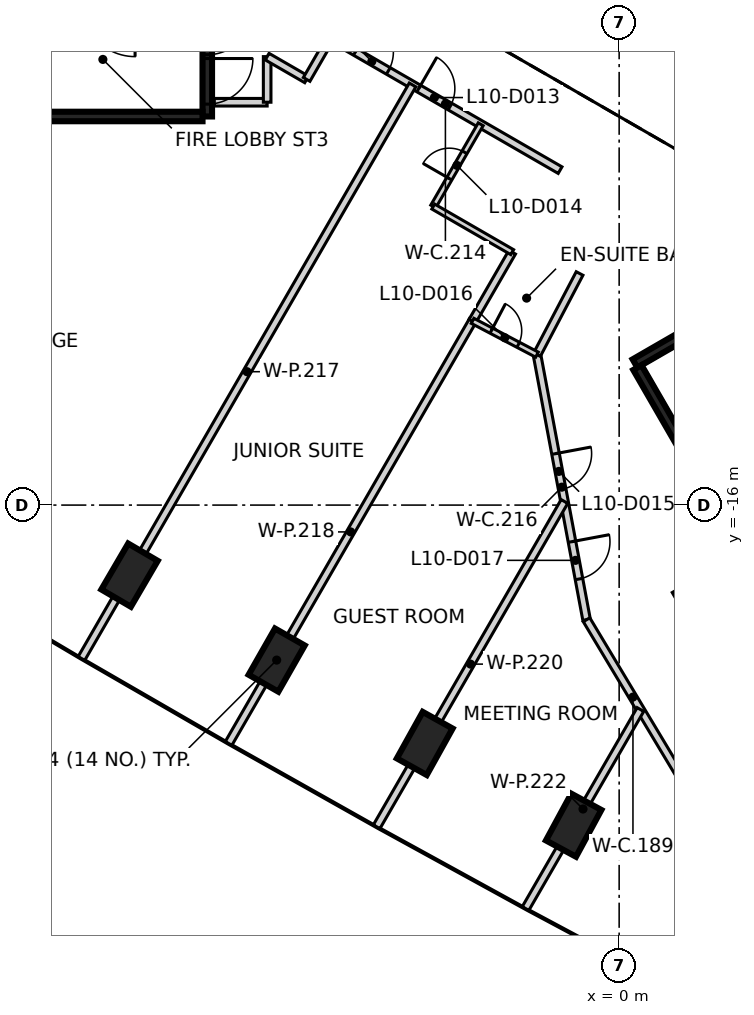
"""IFC4 building model, lengths in metres.
Left out: names, types, materials, properties, quantities, classifications, styles, units other than length and angle.
Written with IfcOpenShell. Run it as: python <this file> out.ifc"""

import sys

from ifc_helpers import new_model, si_unit, direction, frame, frame_2d, origin, origin_2d, place, context, subcontext, project, spatial, rectangle, extrude, element, fill, save


model = new_model("IFC4")
c1 = context("Model", 3, precision=1e-05, world=origin(), true_north=direction((0.0, 1.0)))
c2 = subcontext(c1, "Body", "Model", "MODEL_VIEW")
j1 = project(units=[si_unit("LENGTHUNIT", "METRE"), si_unit("PLANEANGLEUNIT", "RADIAN")], contexts=[c1])
p1 = place(None, origin())
s1 = spatial("IfcSite", under=j1, at=p1, CompositionType="ELEMENT")
p2 = place(p1, origin())
s2 = spatial("IfcBuilding", under=s1, at=p2, CompositionType="ELEMENT")
p3 = place(p2, frame((0.0, 0.0, 49.4)))
s3 = spatial("IfcBuildingStorey", under=s2, at=p3, CompositionType="ELEMENT", Elevation=49.4)
for number, where, z_axis, x_axis in (
    (1, (-12.883, -17.844, -0.475), (0.0, 0.0, 1.0), (0.505, 0.863, 0.0)),
    (2, (-9.011, -20.079, -0.475), (0.0, 0.0, 1.0), (0.495, 0.869, 0.0)),
    (3, (-5.116, -22.272, -0.475), (0.0, 0.0, 1.0), (0.486, 0.874, 0.0)),
    (4, (-1.197, -24.423, -0.475), (0.0, 0.0, 1.0), (0.476, 0.879, 0.0)),
):
    element("IfcColumn", number, at=place(p3, frame(where, z_axis=z_axis, x_axis=x_axis)), inside=s3, PredefinedType="COLUMN", context=c2, shape_type="SweptSolid", body=[
        extrude(rectangle(XDim=1.4, YDim=0.9, at=origin_2d()), origin(), (0.0, 0.0, 1.0), 3.6),
    ])
p4 = place(p3, frame((-10.837, 5.775, 0.0), z_axis=(0.0, 0.0, 1.0), x_axis=(0.0, -1.0, 0.0)))
e5 = element("IfcWall", 5, at=p4, inside=s3, PredefinedType="SHEAR", context=c2, shape_type="SweptSolid", body=[
    extrude(rectangle(XDim=11.55, YDim=0.25, at=frame_2d((5.775, 0.0))), origin(), (0.0, 0.0, 1.0), 3.125),
])
p5 = place(p4, frame((10.025, 0.0, 0.0)))
e6 = element("IfcOpeningElement", 6, at=p5, cuts=e5, PredefinedType="OPENING", context=c2, shape_type="SweptSolid", body=[
    extrude(rectangle(XDim=1.2, YDim=2.1, at=frame_2d((0.6, 1.05))), frame((0.0, 0.135, 0.0), z_axis=(0.0, -1.0, 0.0), x_axis=(1.0, 0.0, 0.0)), (0.0, 0.0, 1.0), 0.27),
])
p6 = place(p4, frame((8.725, 0.0, 0.0)))
e7 = element("IfcOpeningElement", 7, at=p6, cuts=e5, PredefinedType="OPENING", context=c2, shape_type="SweptSolid", body=[
    extrude(rectangle(XDim=1.2, YDim=2.1, at=frame_2d((0.6, 1.05))), frame((0.0, 0.135, 0.0), z_axis=(0.0, -1.0, 0.0), x_axis=(1.0, 0.0, 0.0)), (0.0, 0.0, 1.0), 0.27),
])
p7 = place(p3, frame((-10.963, -5.775, 0.0), z_axis=(0.0, 0.0, 1.0), x_axis=(-1.0, 0.0, 0.0)))
e8 = element("IfcWall", 8, at=p7, inside=s3, PredefinedType="SHEAR", context=c2, shape_type="SweptSolid", body=[
    extrude(rectangle(XDim=5.225, YDim=0.25, at=frame_2d((2.612, 0.0))), origin(), (0.0, 0.0, 1.0), 3.125),
])
p8 = place(p3, frame((0.417, -12.273, 0.0), z_axis=(0.0, 0.0, 1.0), x_axis=(0.866021906294, 0.500006057782, 0.0)))
e9 = element("IfcWall", 9, at=p8, inside=s3, PredefinedType="SHEAR", context=c2, shape_type="SweptSolid", body=[
    extrude(rectangle(XDim=11.55, YDim=0.25, at=frame_2d((5.775, 0.0))), origin(), (0.0, 0.0, 1.0), 3.125),
])
p9 = place(p8, frame((10.025, 0.0, 0.0)))
e10 = element("IfcOpeningElement", 10, at=p9, cuts=e9, PredefinedType="OPENING", context=c2, shape_type="SweptSolid", body=[
    extrude(rectangle(XDim=1.2, YDim=2.1, at=frame_2d((0.6, 1.05))), frame((0.0, 0.135, 0.0), z_axis=(0.0, -1.0, 0.0), x_axis=(1.0, 0.0, 0.0)), (0.0, 0.0, 1.0), 0.27),
])
p10 = place(p8, frame((8.725, 0.0, 0.0)))
e11 = element("IfcOpeningElement", 11, at=p10, cuts=e9, PredefinedType="OPENING", context=c2, shape_type="SweptSolid", body=[
    extrude(rectangle(XDim=1.2, YDim=2.1, at=frame_2d((0.6, 1.05))), frame((0.0, 0.135, 0.0), z_axis=(0.0, -1.0, 0.0), x_axis=(1.0, 0.0, 0.0)), (0.0, 0.0, 1.0), 0.27),
])
p11 = place(p3, frame((3.235, -17.153, 0.0), z_axis=(0.0, 0.0, 1.0), x_axis=(-0.500008851346, 0.866020293397, 0.0)))
e12 = element("IfcWall", 12, at=p11, inside=s3, PredefinedType="SHEAR", context=c2, shape_type="SweptSolid", body=[
    extrude(rectangle(XDim=5.51, YDim=0.25, at=frame_2d((2.755, 0.0))), origin(), (0.0, 0.0, 1.0), 3.125),
])
p12 = place(p3, frame((-10.652, -5.4, 0.0), z_axis=(0.0, 0.0, 1.0), x_axis=(1.0, 0.0, 0.0)))
e13 = element("IfcWall", 13, at=p12, inside=s3, PredefinedType="PARTITIONING", context=c2, shape_type="SweptSolid", body=[
    extrude(rectangle(XDim=1.39, YDim=0.2, at=frame_2d((0.695, 0.0))), origin(), (0.0, 0.0, 1.0), 3.125),
])
for number, where, z_axis, x_axis in (
    (14, (-9.262, -5.4, 0.0), (0.0, 0.0, 1.0), (0.0, 1.0, 0.0)),
    (15, (-9.262, -4.2, 0.0), (0.0, 0.0, 1.0), (0.866, -0.5, 0.0)),
):
    element("IfcWall", number, at=place(p3, frame(where, z_axis=z_axis, x_axis=x_axis)), inside=s3, PredefinedType="PARTITIONING", context=c2, shape_type="SweptSolid", body=[
        extrude(rectangle(XDim=1.2, YDim=0.2, at=frame_2d((0.6, 0.0))), origin(), (0.0, 0.0, 1.0), 3.125),
    ])
p13 = place(p3, frame((-8.223, -4.8, 0.0), z_axis=(0.0, 0.0, 1.0), x_axis=(0.499866914522, 0.866102227088, 0.0)))
e16 = element("IfcWall", 16, at=p13, inside=s3, PredefinedType="PARTITIONING", context=c2, shape_type="SweptSolid", body=[
    extrude(rectangle(XDim=1.268, YDim=0.2, at=frame_2d((0.634, 0.0))), origin(), (0.0, 0.0, 1.0), 3.125),
])
p14 = place(p3, frame((-7.589, -3.702, 0.0), z_axis=(0.0, 0.0, 1.0), x_axis=(0.865994210678, -0.500054024153, 0.0)))
e17 = element("IfcWall", 17, at=p14, inside=s3, PredefinedType="PARTITIONING", context=c2, shape_type="SweptSolid", body=[
    extrude(rectangle(XDim=6.969, YDim=0.2, at=frame_2d((3.484, 0.0))), origin(), (0.0, 0.0, 1.0), 3.125),
])
p15 = place(p14, frame((0.749, 0.0, 0.0)))
e18 = element("IfcOpeningElement", 18, at=p15, cuts=e17, PredefinedType="OPENING", context=c2, shape_type="SweptSolid", body=[
    extrude(rectangle(XDim=1.0, YDim=2.1, at=frame_2d((0.5, 1.05))), frame((0.0, 0.11, 0.0), z_axis=(0.0, -1.0, 0.0), x_axis=(1.0, 0.0, 0.0)), (0.0, 0.0, 1.0), 0.22),
])
p16 = place(p14, frame((2.674, 0.0, 0.0)))
e19 = element("IfcOpeningElement", 19, at=p16, cuts=e17, PredefinedType="OPENING", context=c2, shape_type="SweptSolid", body=[
    extrude(rectangle(XDim=0.95, YDim=2.1, at=frame_2d((0.475, 1.05))), frame((0.0, 0.11, 0.0), z_axis=(0.0, -1.0, 0.0), x_axis=(1.0, 0.0, 0.0)), (0.0, 0.0, 1.0), 0.22),
])
p17 = place(p3, frame((-2.162, -12.042, 0.0), z_axis=(0.0, 0.0, 1.0), x_axis=(0.183949825522, -0.982935634561, 0.0)))
e20 = element("IfcWall", 20, at=p17, inside=s3, PredefinedType="PARTITIONING", context=c2, shape_type="SweptSolid", body=[
    extrude(rectangle(XDim=7.094, YDim=0.2, at=frame_2d((3.547, 0.0))), origin(), (0.0, 0.0, 1.0), 3.125),
])
p18 = place(p17, frame((2.65, 0.0, 0.0)))
e21 = element("IfcOpeningElement", 21, at=p18, cuts=e20, PredefinedType="OPENING", context=c2, shape_type="SweptSolid", body=[
    extrude(rectangle(XDim=0.95, YDim=2.1, at=frame_2d((0.475, 1.05))), frame((0.0, 0.11, 0.0), z_axis=(0.0, -1.0, 0.0), x_axis=(1.0, 0.0, 0.0)), (0.0, 0.0, 1.0), 0.22),
])
p19 = place(p17, frame((5.006, 0.0, 0.0)))
e22 = element("IfcOpeningElement", 22, at=p19, cuts=e20, PredefinedType="OPENING", context=c2, shape_type="SweptSolid", body=[
    extrude(rectangle(XDim=1.0, YDim=2.1, at=frame_2d((0.5, 1.05))), frame((0.0, 0.11, 0.0), z_axis=(0.0, -1.0, 0.0), x_axis=(1.0, 0.0, 0.0)), (0.0, 0.0, 1.0), 0.22),
])
p20 = place(p3, frame((-2.162, -12.041, 0.0), z_axis=(0.0, 0.0, 1.0), x_axis=(0.464903343334, 0.885361441083, 0.0)))
e23 = element("IfcWall", 23, at=p20, inside=s3, PredefinedType="PARTITIONING", context=c2, shape_type="SweptSolid", body=[
    extrude(rectangle(XDim=2.411, YDim=0.2, at=frame_2d((1.206, 0.0))), origin(), (0.0, 0.0, 1.0), 3.125),
])
p21 = place(p3, frame((-0.858, -19.017, 0.0), z_axis=(0.0, 0.0, 1.0), x_axis=(0.514647068805, -0.857402119528, 0.0)))
e24 = element("IfcWall", 24, at=p21, inside=s3, PredefinedType="PARTITIONING", context=c2, shape_type="SweptSolid", body=[
    extrude(rectangle(XDim=4.745, YDim=0.2, at=frame_2d((2.373, 0.0))), origin(), (0.0, 0.0, 1.0), 3.125),
])
p22 = place(p3, frame((-14.148, -20.035, 0.0), z_axis=(0.0, 0.0, 1.0), x_axis=(0.499978771293, 0.866037659837, 0.0)))
e25 = element("IfcWall", 25, at=p22, inside=s3, PredefinedType="PARTITIONING", context=c2, shape_type="SweptSolid", body=[
    extrude(rectangle(XDim=17.425, YDim=0.2, at=frame_2d((8.712, 0.0))), origin(), (0.0, 0.0, 1.0), 3.125),
])
p23 = place(p3, frame((-10.276, -22.271, 0.0), z_axis=(0.0, 0.0, 1.0), x_axis=(0.499984478165, 0.866034365135, 0.0)))
e26 = element("IfcWall", 26, at=p23, inside=s3, PredefinedType="PARTITIONING", context=c2, shape_type="SweptSolid", body=[
    extrude(rectangle(XDim=12.851, YDim=0.2, at=frame_2d((6.426, 0.0))), origin(), (0.0, 0.0, 1.0), 3.125),
])
p24 = place(p3, frame((-6.381, -24.464, 0.0), z_axis=(0.0, 0.0, 1.0), x_axis=(0.500007577232, 0.866021029023, 0.0)))
e27 = element("IfcWall", 27, at=p24, inside=s3, PredefinedType="PARTITIONING", context=c2, shape_type="SweptSolid", body=[
    extrude(rectangle(XDim=9.883, YDim=0.2, at=frame_2d((4.941, 0.0))), origin(), (0.0, 0.0, 1.0), 3.125),
])
p25 = place(p3, frame((-3.863, -11.163, 0.0), z_axis=(0.0, 0.0, 1.0), x_axis=(0.499779509621, 0.866152666545, 0.0)))
e28 = element("IfcWall", 28, at=p25, inside=s3, PredefinedType="PARTITIONING", context=c2, shape_type="SweptSolid", body=[
    extrude(rectangle(XDim=2.099, YDim=0.2, at=frame_2d((1.05, 0.0))), origin(), (0.0, 0.0, 1.0), 3.125),
])
p26 = place(p3, frame((-2.462, -26.615, 0.0), z_axis=(0.0, 0.0, 1.0), x_axis=(0.49992636536, 0.86606791259, 0.0)))
e29 = element("IfcWall", 29, at=p26, inside=s3, PredefinedType="PARTITIONING", context=c2, shape_type="SweptSolid", body=[
    extrude(rectangle(XDim=6.046, YDim=0.2, at=frame_2d((3.023, 0.0))), origin(), (0.0, 0.0, 1.0), 3.125),
])
p27 = place(p3, frame((-4.892, -8.145, 0.0), z_axis=(0.0, 0.0, 1.0), x_axis=(0.499711178953, 0.866192090491, 0.0)))
e30 = element("IfcWall", 30, at=p27, inside=s3, PredefinedType="PARTITIONING", context=c2, shape_type="SweptSolid", body=[
    extrude(rectangle(XDim=2.5, YDim=0.15, at=frame_2d((1.25, 0.0))), origin(), (0.0, 0.0, 1.0), 3.125),
])
p28 = place(p27, frame((0.85, 0.0, 0.0)))
e31 = element("IfcOpeningElement", 31, at=p28, cuts=e30, PredefinedType="OPENING", context=c2, shape_type="SweptSolid", body=[
    extrude(rectangle(XDim=0.8, YDim=2.1, at=frame_2d((0.4, 1.05))), frame((0.0, 0.085, 0.0), z_axis=(0.0, -1.0, 0.0), x_axis=(1.0, 0.0, 0.0)), (0.0, 0.0, 1.0), 0.17),
])
p29 = place(p3, frame((-4.892, -8.145, 0.0), z_axis=(0.0, 0.0, 1.0), x_axis=(0.865999212041, -0.500045362686, 0.0)))
e32 = element("IfcWall", 32, at=p29, inside=s3, PredefinedType="PARTITIONING", context=c2, shape_type="SweptSolid", body=[
    extrude(rectangle(XDim=2.4, YDim=0.15, at=frame_2d((1.2, 0.0))), origin(), (0.0, 0.0, 1.0), 3.125),
])
p30 = place(p3, frame((-3.857, -11.152, 0.0), z_axis=(0.0, 0.0, 1.0), x_axis=(0.885374281086, -0.464878890026, 0.0)))
e33 = element("IfcWall", 33, at=p30, inside=s3, PredefinedType="PARTITIONING", context=c2, shape_type="SweptSolid", body=[
    extrude(rectangle(XDim=1.914, YDim=0.15, at=frame_2d((0.957, 0.0))), origin(), (0.0, 0.0, 1.0), 3.125),
])
p31 = place(p30, frame((0.557, 0.0, 0.0)))
e34 = element("IfcOpeningElement", 34, at=p31, cuts=e33, PredefinedType="OPENING", context=c2, shape_type="SweptSolid", body=[
    extrude(rectangle(XDim=0.8, YDim=2.1, at=frame_2d((0.4, 1.05))), frame((0.0, 0.085, 0.0), z_axis=(0.0, -1.0, 0.0), x_axis=(1.0, 0.0, 0.0)), (0.0, 0.0, 1.0), 0.17),
])
p32 = place(p5, origin())
e35 = element("IfcDoor", 35, at=p32, inside=s3, OperationType="SINGLE_SWING_LEFT", PredefinedType="DOOR", context=c2, shape_type="SweptSolid", body=[
    extrude(rectangle(XDim=1.2, YDim=2.1, at=frame_2d((0.6, 1.05))), frame((0.0, 0.025, 0.0), z_axis=(0.0, -1.0, 0.0), x_axis=(1.0, 0.0, 0.0)), (0.0, 0.0, 1.0), 0.05),
])
fill(e6, e35)
p33 = place(p6, origin())
e36 = element("IfcDoor", 36, at=p33, inside=s3, OperationType="SINGLE_SWING_RIGHT", PredefinedType="DOOR", context=c2, shape_type="SweptSolid", body=[
    extrude(rectangle(XDim=1.2, YDim=2.1, at=frame_2d((0.6, 1.05))), frame((0.0, 0.025, 0.0), z_axis=(0.0, -1.0, 0.0), x_axis=(1.0, 0.0, 0.0)), (0.0, 0.0, 1.0), 0.05),
])
fill(e7, e36)
p34 = place(p15, frame((1.0, 0.0, 0.0), z_axis=(0.0, 0.0, 1.0), x_axis=(-1.0, 0.0, 0.0)))
e37 = element("IfcDoor", 37, at=p34, inside=s3, OperationType="SINGLE_SWING_LEFT", PredefinedType="DOOR", context=c2, shape_type="SweptSolid", body=[
    extrude(rectangle(XDim=1.0, YDim=2.1, at=frame_2d((0.5, 1.05))), frame((0.0, 0.025, 0.0), z_axis=(0.0, -1.0, 0.0), x_axis=(1.0, 0.0, 0.0)), (0.0, 0.0, 1.0), 0.05),
])
fill(e18, e37)
p35 = place(p16, frame((0.95, 0.0, 0.0), z_axis=(0.0, 0.0, 1.0), x_axis=(-1.0, 0.0, 0.0)))
e38 = element("IfcDoor", 38, at=p35, inside=s3, OperationType="SINGLE_SWING_LEFT", PredefinedType="DOOR", context=c2, shape_type="SweptSolid", body=[
    extrude(rectangle(XDim=0.95, YDim=2.1, at=frame_2d((0.475, 1.05))), frame((0.0, 0.025, 0.0), z_axis=(0.0, -1.0, 0.0), x_axis=(1.0, 0.0, 0.0)), (0.0, 0.0, 1.0), 0.05),
])
fill(e19, e38)
p36 = place(p28, frame((0.8, 0.0, 0.0), z_axis=(0.0, 0.0, 1.0), x_axis=(-1.0, 0.0, 0.0)))
e39 = element("IfcDoor", 39, at=p36, inside=s3, OperationType="SINGLE_SWING_LEFT", PredefinedType="DOOR", context=c2, shape_type="SweptSolid", body=[
    extrude(rectangle(XDim=0.8, YDim=2.1, at=frame_2d((0.4, 1.05))), frame((0.0, 0.025, 0.0), z_axis=(0.0, -1.0, 0.0), x_axis=(1.0, 0.0, 0.0)), (0.0, 0.0, 1.0), 0.05),
])
fill(e31, e39)
p37 = place(p18, frame((0.95, 0.0, 0.0), z_axis=(0.0, 0.0, 1.0), x_axis=(-1.0, 0.0, 0.0)))
e40 = element("IfcDoor", 40, at=p37, inside=s3, OperationType="SINGLE_SWING_LEFT", PredefinedType="DOOR", context=c2, shape_type="SweptSolid", body=[
    extrude(rectangle(XDim=0.95, YDim=2.1, at=frame_2d((0.475, 1.05))), frame((0.0, 0.025, 0.0), z_axis=(0.0, -1.0, 0.0), x_axis=(1.0, 0.0, 0.0)), (0.0, 0.0, 1.0), 0.05),
])
fill(e21, e40)
p38 = place(p31, frame((0.8, 0.0, 0.0), z_axis=(0.0, 0.0, 1.0), x_axis=(-1.0, 0.0, 0.0)))
e41 = element("IfcDoor", 41, at=p38, inside=s3, OperationType="SINGLE_SWING_LEFT", PredefinedType="DOOR", context=c2, shape_type="SweptSolid", body=[
    extrude(rectangle(XDim=0.8, YDim=2.1, at=frame_2d((0.4, 1.05))), frame((0.0, 0.025, 0.0), z_axis=(0.0, -1.0, 0.0), x_axis=(1.0, 0.0, 0.0)), (0.0, 0.0, 1.0), 0.05),
])
fill(e34, e41)
p39 = place(p19, frame((1.0, 0.0, 0.0), z_axis=(0.0, 0.0, 1.0), x_axis=(-1.0, 0.0, 0.0)))
e42 = element("IfcDoor", 42, at=p39, inside=s3, OperationType="SINGLE_SWING_LEFT", PredefinedType="DOOR", context=c2, shape_type="SweptSolid", body=[
    extrude(rectangle(XDim=1.0, YDim=2.1, at=frame_2d((0.5, 1.05))), frame((0.0, 0.025, 0.0), z_axis=(0.0, -1.0, 0.0), x_axis=(1.0, 0.0, 0.0)), (0.0, 0.0, 1.0), 0.05),
])
fill(e22, e42)
save(model, sys.argv[1])
